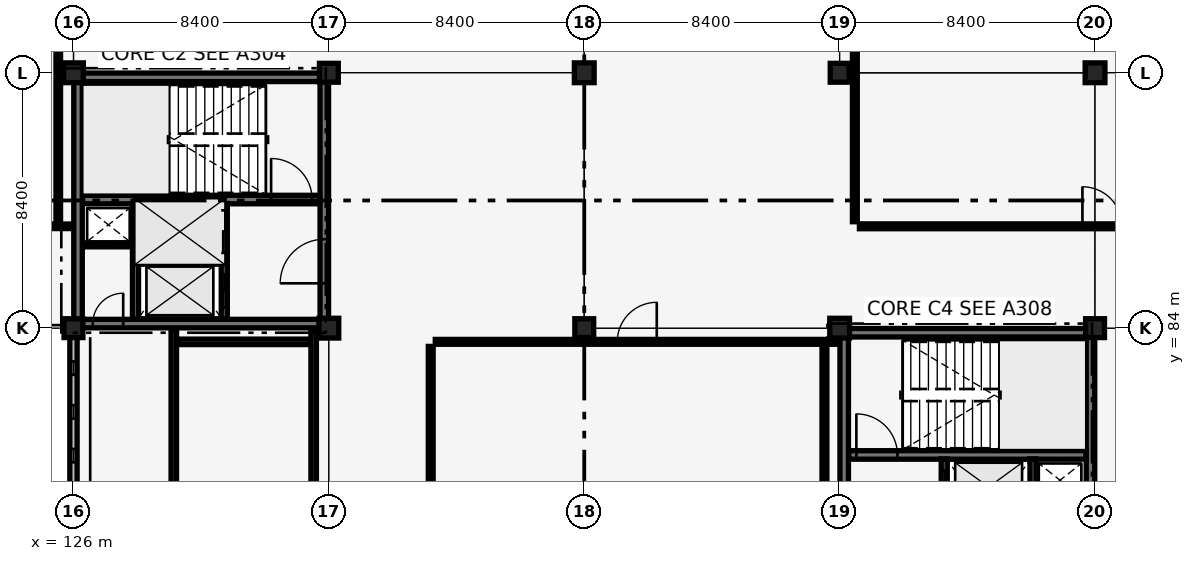
"""IFC4 building model, lengths in metres.
Left out: names, types, materials, properties, quantities, classifications, styles, units other than length and angle.
Written with IfcOpenShell. Run it as: python <this file> out.ifc"""

import sys

from ifc_helpers import new_model, si_unit, direction, frame, frame_2d, origin, origin_2d, place, context, subcontext, project, spatial, rectangle, extrude, element, fill, save


model = new_model("IFC4")
c1 = context("Model", 3, precision=1e-05, world=origin(), true_north=direction((0.0, 1.0)))
c2 = subcontext(c1, "Body", "Model", "MODEL_VIEW")
j1 = project(units=[si_unit("LENGTHUNIT", "METRE"), si_unit("PLANEANGLEUNIT", "RADIAN")], contexts=[c1])
p1 = place(None, origin())
s1 = spatial("IfcSite", under=j1, at=p1, CompositionType="ELEMENT")
p2 = place(p1, origin())
s2 = spatial("IfcBuilding", under=s1, at=p2, CompositionType="ELEMENT")
p3 = place(p2, frame((0.0, 0.0, 13.94)))
s3 = spatial("IfcBuildingStorey", under=s2, at=p3, CompositionType="ELEMENT", Elevation=13.94)
p4 = place(p3, frame((126.15, 84.15, 0.0), z_axis=(0.0, 0.0, 1.0), x_axis=(1.0, 0.0, 0.0)))
e1 = element("IfcWall", 1, at=p4, inside=s3, PredefinedType="SHEAR", context=c2, shape_type="SweptSolid", body=[
    extrude(rectangle(XDim=8.1, YDim=0.28, at=frame_2d((4.05, 0.0))), origin(), (0.0, 0.0, 1.0), 3.78),
])
p5 = place(p4, frame((0.485, 0.0, 0.0)))
e2 = element("IfcOpeningElement", 2, at=p5, cuts=e1, PredefinedType="OPENING", context=c2, shape_type="SweptSolid", body=[
    extrude(rectangle(XDim=1.0, YDim=2.15, at=frame_2d((0.5, 1.075))), frame((0.0, 0.15, 0.0), z_axis=(0.0, -1.0, 0.0), x_axis=(1.0, 0.0, 0.0)), (0.0, 0.0, 1.0), 0.3),
])
for number, where, z_axis, x_axis in (
    (3, (126.15, 92.25, 0.0), (0.0, 0.0, 1.0), (1.0, 0.0, 0.0)),
    (4, (126.15, 84.15, 0.0), (0.0, 0.0, 1.0), (0.0, 1.0, 0.0)),
):
    element("IfcWall", number, at=place(p3, frame(where, z_axis=z_axis, x_axis=x_axis)), inside=s3, PredefinedType="SHEAR", context=c2, shape_type="SweptSolid", body=[
        extrude(rectangle(XDim=8.1, YDim=0.28, at=frame_2d((4.05, 0.0))), origin(), (0.0, 0.0, 1.0), 3.78),
    ])
p6 = place(p3, frame((134.25, 84.15, 0.0), z_axis=(0.0, 0.0, 1.0), x_axis=(0.0, 1.0, 0.0)))
e5 = element("IfcWall", 5, at=p6, inside=s3, PredefinedType="SHEAR", context=c2, shape_type="SweptSolid", body=[
    extrude(rectangle(XDim=8.1, YDim=0.28, at=frame_2d((4.05, 0.0))), origin(), (0.0, 0.0, 1.0), 3.78),
])
p7 = place(p6, frame((1.325, 0.0, 0.0)))
e6 = element("IfcOpeningElement", 6, at=p7, cuts=e5, PredefinedType="OPENING", context=c2, shape_type="SweptSolid", body=[
    extrude(rectangle(XDim=1.45, YDim=2.15, at=frame_2d((0.725, 1.075))), frame((0.0, 0.15, 0.0), z_axis=(0.0, -1.0, 0.0), x_axis=(1.0, 0.0, 0.0)), (0.0, 0.0, 1.0), 0.3),
])
p8 = place(p3, frame((126.3, 88.23, 0.0), z_axis=(0.0, 0.0, 1.0), x_axis=(1.0, 0.0, 0.0)))
e7 = element("IfcWall", 7, at=p8, inside=s3, PredefinedType="SHEAR", context=c2, shape_type="SweptSolid", body=[
    extrude(rectangle(XDim=7.8, YDim=0.28, at=frame_2d((3.9, 0.0))), origin(), (0.0, 0.0, 1.0), 3.78),
])
p9 = place(p8, frame((6.2, 0.0, 0.0)))
e8 = element("IfcOpeningElement", 8, at=p9, cuts=e7, PredefinedType="OPENING", context=c2, shape_type="SweptSolid", body=[
    extrude(rectangle(XDim=1.35, YDim=2.15, at=frame_2d((0.675, 1.075))), frame((0.0, 0.15, 0.0), z_axis=(0.0, -1.0, 0.0), x_axis=(1.0, 0.0, 0.0)), (0.0, 0.0, 1.0), 0.3),
])
p10 = place(p3, frame((151.35, 83.85, 0.0), z_axis=(0.0, 0.0, 1.0), x_axis=(1.0, 0.0, 0.0)))
e9 = element("IfcWall", 9, at=p10, inside=s3, PredefinedType="SHEAR", context=c2, shape_type="SweptSolid", body=[
    extrude(rectangle(XDim=8.1, YDim=0.28, at=frame_2d((4.05, 0.0))), origin(), (0.0, 0.0, 1.0), 3.78),
])
p11 = place(p3, frame((151.35, 75.75, 0.0), z_axis=(0.0, 0.0, 1.0), x_axis=(0.0, 1.0, 0.0)))
e10 = element("IfcWall", 10, at=p11, inside=s3, PredefinedType="SHEAR", context=c2, shape_type="SweptSolid", body=[
    extrude(rectangle(XDim=8.1, YDim=0.28, at=frame_2d((4.05, 0.0))), origin(), (0.0, 0.0, 1.0), 3.78),
])
p12 = place(p11, frame((1.325, 0.0, 0.0)))
e11 = element("IfcOpeningElement", 11, at=p12, cuts=e10, PredefinedType="OPENING", context=c2, shape_type="SweptSolid", body=[
    extrude(rectangle(XDim=1.45, YDim=2.15, at=frame_2d((0.725, 1.075))), frame((0.0, 0.15, 0.0), z_axis=(0.0, -1.0, 0.0), x_axis=(1.0, 0.0, 0.0)), (0.0, 0.0, 1.0), 0.3),
])
p13 = place(p3, frame((159.45, 75.75, 0.0), z_axis=(0.0, 0.0, 1.0), x_axis=(0.0, 1.0, 0.0)))
e12 = element("IfcWall", 12, at=p13, inside=s3, PredefinedType="SHEAR", context=c2, shape_type="SweptSolid", body=[
    extrude(rectangle(XDim=8.1, YDim=0.28, at=frame_2d((4.05, 0.0))), origin(), (0.0, 0.0, 1.0), 3.78),
])
p14 = place(p3, frame((151.5, 79.83, 0.0), z_axis=(0.0, 0.0, 1.0), x_axis=(1.0, 0.0, 0.0)))
e13 = element("IfcWall", 13, at=p14, inside=s3, PredefinedType="SHEAR", context=c2, shape_type="SweptSolid", body=[
    extrude(rectangle(XDim=7.8, YDim=0.28, at=frame_2d((3.9, 0.0))), origin(), (0.0, 0.0, 1.0), 3.78),
])
p15 = place(p14, frame((0.25, 0.0, 0.0)))
e14 = element("IfcOpeningElement", 14, at=p15, cuts=e13, PredefinedType="OPENING", context=c2, shape_type="SweptSolid", body=[
    extrude(rectangle(XDim=1.35, YDim=2.15, at=frame_2d((0.675, 1.075))), frame((0.0, 0.15, 0.0), z_axis=(0.0, -1.0, 0.0), x_axis=(1.0, 0.0, 0.0)), (0.0, 0.0, 1.0), 0.3),
])
p16 = place(p3, frame((126.0, 84.0, 0.0), z_axis=(0.0, 0.0, 1.0), x_axis=(1.0, 0.0, 0.0)))
e15 = element("IfcColumn", 15, at=p16, inside=s3, PredefinedType="COLUMN", context=c2, shape_type="SweptSolid", body=[
    extrude(rectangle(XDim=0.62, YDim=0.62, at=origin_2d()), origin(), (0.0, 0.0, 1.0), 3.78),
])
for number, where, z_axis, x_axis in (
    (16, (126.0, 92.4, 0.0), (0.0, 0.0, 1.0), (1.0, 0.0, 0.0)),
    (17, (134.4, 84.0, 0.0), (0.0, 0.0, 1.0), (1.0, 0.0, 0.0)),
):
    element("IfcColumn", number, at=place(p3, frame(where, z_axis=z_axis, x_axis=x_axis)), inside=s3, PredefinedType="COLUMN", context=c2, shape_type="SweptSolid", body=[
        extrude(rectangle(XDim=0.65, YDim=0.65, at=origin_2d()), origin(), (0.0, 0.0, 1.0), 3.78),
    ])
for number, where, z_axis, x_axis in (
    (18, (134.4, 92.4, 0.0), (0.0, 0.0, 1.0), (1.0, 0.0, 0.0)),
    (19, (142.8, 84.0, 0.0), (0.0, 0.0, 1.0), (1.0, 0.0, 0.0)),
):
    element("IfcColumn", number, at=place(p3, frame(where, z_axis=z_axis, x_axis=x_axis)), inside=s3, PredefinedType="COLUMN", context=c2, shape_type="SweptSolid", body=[
        extrude(rectangle(XDim=0.62, YDim=0.62, at=origin_2d()), origin(), (0.0, 0.0, 1.0), 3.78),
    ])
for number, where, z_axis, x_axis in (
    (20, (142.8, 92.4, 0.0), (0.0, 0.0, 1.0), (1.0, 0.0, 0.0)),
    (21, (151.2, 84.0, 0.0), (0.0, 0.0, 1.0), (1.0, 0.0, 0.0)),
):
    element("IfcColumn", number, at=place(p3, frame(where, z_axis=z_axis, x_axis=x_axis)), inside=s3, PredefinedType="COLUMN", context=c2, shape_type="SweptSolid", body=[
        extrude(rectangle(XDim=0.65, YDim=0.65, at=origin_2d()), origin(), (0.0, 0.0, 1.0), 3.78),
    ])
for number, where, z_axis, x_axis in (
    (22, (151.2, 92.4, 0.0), (0.0, 0.0, 1.0), (1.0, 0.0, 0.0)),
    (23, (159.6, 84.0, 0.0), (0.0, 0.0, 1.0), (1.0, 0.0, 0.0)),
):
    element("IfcColumn", number, at=place(p3, frame(where, z_axis=z_axis, x_axis=x_axis)), inside=s3, PredefinedType="COLUMN", context=c2, shape_type="SweptSolid", body=[
        extrude(rectangle(XDim=0.62, YDim=0.62, at=origin_2d()), origin(), (0.0, 0.0, 1.0), 3.78),
    ])
p17 = place(p3, frame((159.6, 92.4, 0.0), z_axis=(0.0, 0.0, 1.0), x_axis=(1.0, 0.0, 0.0)))
e24 = element("IfcColumn", 24, at=p17, inside=s3, PredefinedType="COLUMN", context=c2, shape_type="SweptSolid", body=[
    extrude(rectangle(XDim=0.65, YDim=0.65, at=origin_2d()), origin(), (0.0, 0.0, 1.0), 3.78),
])
p18 = place(p3, frame((126.0, 75.91, 0.0), z_axis=(0.0, 0.0, 1.0), x_axis=(0.0, 1.0, 0.0)))
e25 = element("IfcWall", 25, at=p18, inside=s3, PredefinedType="SOLIDWALL", context=c2, shape_type="SweptSolid", body=[
    extrude(rectangle(XDim=7.795, YDim=0.24, at=frame_2d((3.897, 0.0))), origin(), (0.0, 0.0, 1.0), 3.15),
])
p19 = place(p18, frame((0.8, 0.0, 0.35)))
e26 = element("IfcOpeningElement", 26, at=p19, cuts=e25, PredefinedType="OPENING", context=c2, shape_type="SweptSolid", body=[
    extrude(rectangle(XDim=0.44, YDim=1.25, at=frame_2d((0.22, 0.625))), frame((0.0, 0.13, 0.0), z_axis=(0.0, -1.0, 0.0), x_axis=(1.0, 0.0, 0.0)), (0.0, 0.0, 1.0), 0.26),
])
p20 = place(p18, frame((2.239, 0.0, 0.35)))
e27 = element("IfcOpeningElement", 27, at=p20, cuts=e25, PredefinedType="OPENING", context=c2, shape_type="SweptSolid", body=[
    extrude(rectangle(XDim=0.44, YDim=1.25, at=frame_2d((0.22, 0.625))), frame((0.0, 0.13, 0.0), z_axis=(0.0, -1.0, 0.0), x_axis=(1.0, 0.0, 0.0)), (0.0, 0.0, 1.0), 0.26),
])
p21 = place(p18, frame((3.677, 0.0, 0.35)))
e28 = element("IfcOpeningElement", 28, at=p21, cuts=e25, PredefinedType="OPENING", context=c2, shape_type="SweptSolid", body=[
    extrude(rectangle(XDim=0.44, YDim=1.25, at=frame_2d((0.22, 0.625))), frame((0.0, 0.13, 0.0), z_axis=(0.0, -1.0, 0.0), x_axis=(1.0, 0.0, 0.0)), (0.0, 0.0, 1.0), 0.26),
])
p22 = place(p18, frame((5.116, 0.0, 0.35)))
e29 = element("IfcOpeningElement", 29, at=p22, cuts=e25, PredefinedType="OPENING", context=c2, shape_type="SweptSolid", body=[
    extrude(rectangle(XDim=0.44, YDim=1.25, at=frame_2d((0.22, 0.625))), frame((0.0, 0.13, 0.0), z_axis=(0.0, -1.0, 0.0), x_axis=(1.0, 0.0, 0.0)), (0.0, 0.0, 1.0), 0.26),
])
p23 = place(p18, frame((6.555, 0.0, 0.35)))
e30 = element("IfcOpeningElement", 30, at=p23, cuts=e25, PredefinedType="OPENING", context=c2, shape_type="SweptSolid", body=[
    extrude(rectangle(XDim=0.44, YDim=1.25, at=frame_2d((0.22, 0.625))), frame((0.0, 0.13, 0.0), z_axis=(0.0, -1.0, 0.0), x_axis=(1.0, 0.0, 0.0)), (0.0, 0.0, 1.0), 0.26),
])
p24 = place(p3, frame((130.96, 84.3, 0.0), z_axis=(0.0, 0.0, 1.0), x_axis=(0.0, 1.0, 0.0)))
e31 = element("IfcWall", 31, at=p24, inside=s3, PredefinedType="SHEAR", context=c2, shape_type="SweptSolid", body=[
    extrude(rectangle(XDim=3.8, YDim=0.2, at=frame_2d((1.9, 0.0))), origin(), (0.0, 0.0, 1.0), 3.05),
])
p25 = place(p24, frame((0.375, 0.0, 0.0)))
e32 = element("IfcOpeningElement", 32, at=p25, cuts=e31, PredefinedType="OPENING", context=c2, shape_type="SweptSolid", body=[
    extrude(rectangle(XDim=1.1, YDim=2.15, at=frame_2d((0.55, 1.075))), frame((0.0, 0.11, 0.0), z_axis=(0.0, -1.0, 0.0), x_axis=(1.0, 0.0, 0.0)), (0.0, 0.0, 1.0), 0.22),
])
p26 = place(p24, frame((2.175, 0.0, 0.0)))
e33 = element("IfcOpeningElement", 33, at=p26, cuts=e31, PredefinedType="OPENING", context=c2, shape_type="SweptSolid", body=[
    extrude(rectangle(XDim=1.4, YDim=2.2, at=frame_2d((0.7, 1.1))), frame((0.0, 0.11, 0.0), z_axis=(0.0, -1.0, 0.0), x_axis=(1.0, 0.0, 0.0)), (0.0, 0.0, 1.0), 0.22),
])
p27 = place(p3, frame((128.04, 84.3, 0.0), z_axis=(0.0, 0.0, 1.0), x_axis=(0.0, 1.0, 0.0)))
e34 = element("IfcWall", 34, at=p27, inside=s3, PredefinedType="SHEAR", context=c2, shape_type="SweptSolid", body=[
    extrude(rectangle(XDim=3.8, YDim=0.2, at=frame_2d((1.9, 0.0))), origin(), (0.0, 0.0, 1.0), 3.05),
])
p28 = place(p3, frame((128.15, 86.2, 0.0), z_axis=(0.0, 0.0, 1.0), x_axis=(1.0, 0.0, 0.0)))
e35 = element("IfcWall", 35, at=p28, inside=s3, PredefinedType="SHEAR", context=c2, shape_type="SweptSolid", body=[
    extrude(rectangle(XDim=2.7, YDim=0.18, at=frame_2d((1.35, 0.0))), origin(), (0.0, 0.0, 1.0), 3.78),
])
p29 = place(p3, frame((126.32, 86.74, 0.0), z_axis=(0.0, 0.0, 1.0), x_axis=(1.0, 0.0, 0.0)))
e36 = element("IfcWall", 36, at=p29, inside=s3, PredefinedType="PARTITIONING", context=c2, shape_type="SweptSolid", body=[
    extrude(rectangle(XDim=1.62, YDim=0.13, at=frame_2d((0.81, 0.0))), origin(), (0.0, 0.0, 1.0), 3.78),
])
p30 = place(p3, frame((154.64, 75.9, 0.0), z_axis=(0.0, 0.0, 1.0), x_axis=(0.0, 1.0, 0.0)))
e37 = element("IfcWall", 37, at=p30, inside=s3, PredefinedType="SHEAR", context=c2, shape_type="SweptSolid", body=[
    extrude(rectangle(XDim=3.8, YDim=0.2, at=frame_2d((1.9, 0.0))), origin(), (0.0, 0.0, 1.0), 3.78),
])
p31 = place(p30, frame((0.375, 0.0, 0.0)))
e38 = element("IfcOpeningElement", 38, at=p31, cuts=e37, PredefinedType="OPENING", context=c2, shape_type="SweptSolid", body=[
    extrude(rectangle(XDim=1.1, YDim=2.15, at=frame_2d((0.55, 1.075))), frame((0.0, 0.11, 0.0), z_axis=(0.0, -1.0, 0.0), x_axis=(1.0, 0.0, 0.0)), (0.0, 0.0, 1.0), 0.22),
])
p32 = place(p30, frame((2.325, 0.0, 0.0)))
e39 = element("IfcOpeningElement", 39, at=p32, cuts=e37, PredefinedType="OPENING", context=c2, shape_type="SweptSolid", body=[
    extrude(rectangle(XDim=1.1, YDim=2.15, at=frame_2d((0.55, 1.075))), frame((0.0, 0.11, 0.0), z_axis=(0.0, -1.0, 0.0), x_axis=(1.0, 0.0, 0.0)), (0.0, 0.0, 1.0), 0.22),
])
p33 = place(p3, frame((157.56, 75.9, 0.0), z_axis=(0.0, 0.0, 1.0), x_axis=(0.0, 1.0, 0.0)))
e40 = element("IfcWall", 40, at=p33, inside=s3, PredefinedType="SHEAR", context=c2, shape_type="SweptSolid", body=[
    extrude(rectangle(XDim=3.8, YDim=0.2, at=frame_2d((1.9, 0.0))), origin(), (0.0, 0.0, 1.0), 3.78),
])
p34 = place(p3, frame((129.45, 83.55, 0.0), z_axis=(0.0, 0.0, 1.0), x_axis=(1.0, 0.0, 0.0)))
e41 = element("IfcWall", 41, at=p34, inside=s3, PredefinedType="PARTITIONING", context=c2, shape_type="SweptSolid", body=[
    extrude(rectangle(XDim=4.3, YDim=0.18, at=frame_2d((2.15, 0.0))), origin(), (0.0, 0.0, 1.0), 3.78),
])
for number, where, z_axis, x_axis in (
    (42, (129.3, 36.7, 0.0), (0.0, 0.0, 1.0), (0.0, 1.0, 0.0)),
    (43, (133.9, 36.7, 0.0), (0.0, 0.0, 1.0), (0.0, 1.0, 0.0)),
):
    element("IfcWall", number, at=place(p3, frame(where, z_axis=z_axis, x_axis=x_axis)), inside=s3, PredefinedType="PARTITIONING", context=c2, shape_type="SweptSolid", body=[
        extrude(rectangle(XDim=47.27, YDim=0.18, at=frame_2d((23.635, 0.0))), origin(), (0.0, 0.0, 1.0), 3.05),
    ])
p35 = place(p3, frame((151.85, 87.35, 0.0), z_axis=(0.0, 0.0, 1.0), x_axis=(1.0, 0.0, 0.0)))
e44 = element("IfcWall", 44, at=p35, inside=s3, PredefinedType="PARTITIONING", context=c2, shape_type="SweptSolid", body=[
    extrude(rectangle(XDim=15.97, YDim=0.16, at=frame_2d((7.985, 0.0))), origin(), (0.0, 0.0, 1.0), 3.15),
])
p36 = place(p35, frame((7.335, 0.0, 0.0)))
e45 = element("IfcOpeningElement", 45, at=p36, cuts=e44, PredefinedType="OPENING", context=c2, shape_type="SweptSolid", body=[
    extrude(rectangle(XDim=1.3, YDim=2.2, at=frame_2d((0.65, 1.1))), frame((0.0, 0.09, 0.0), z_axis=(0.0, -1.0, 0.0), x_axis=(1.0, 0.0, 0.0)), (0.0, 0.0, 1.0), 0.18),
])
p37 = place(p3, frame((151.7, 87.5, 0.0), z_axis=(0.0, 0.0, 1.0), x_axis=(0.0, 1.0, 0.0)))
e46 = element("IfcWall", 46, at=p37, inside=s3, PredefinedType="PARTITIONING", context=c2, shape_type="SweptSolid", body=[
    extrude(rectangle(XDim=29.82, YDim=0.16, at=frame_2d((14.91, 0.0))), origin(), (0.0, 0.0, 1.0), 3.05),
])
p38 = place(p3, frame((109.23, 87.35, 0.0), z_axis=(0.0, 0.0, 1.0), x_axis=(1.0, 0.0, 0.0)))
e47 = element("IfcWall", 47, at=p38, inside=s3, PredefinedType="PARTITIONING", context=c2, shape_type="SweptSolid", body=[
    extrude(rectangle(XDim=16.74, YDim=0.15, at=frame_2d((8.37, 0.0))), origin(), (0.0, 0.0, 1.0), 3.1),
])
p39 = place(p38, frame((7.845, 0.0, 0.0)))
e48 = element("IfcOpeningElement", 48, at=p39, cuts=e47, PredefinedType="OPENING", context=c2, shape_type="SweptSolid", body=[
    extrude(rectangle(XDim=1.05, YDim=2.15, at=frame_2d((0.525, 1.075))), frame((0.0, 0.085, 0.0), z_axis=(0.0, -1.0, 0.0), x_axis=(1.0, 0.0, 0.0)), (0.0, 0.0, 1.0), 0.17),
])
p40 = place(p3, frame((125.5, 87.5, 0.0), z_axis=(0.0, 0.0, 1.0), x_axis=(0.0, 1.0, 0.0)))
e49 = element("IfcWall", 49, at=p40, inside=s3, PredefinedType="PARTITIONING", context=c2, shape_type="SweptSolid", body=[
    extrude(rectangle(XDim=29.82, YDim=0.15, at=frame_2d((14.91, 0.0))), origin(), (0.0, 0.0, 1.0), 3.05),
])
p41 = place(p3, frame((137.9, 83.55, 0.0), z_axis=(0.0, 0.0, 1.0), x_axis=(1.0, 0.0, 0.0)))
e50 = element("IfcWall", 50, at=p41, inside=s3, PredefinedType="PARTITIONING", context=c2, shape_type="SweptSolid", body=[
    extrude(rectangle(XDim=13.27, YDim=0.16, at=frame_2d((6.635, 0.0))), origin(), (0.0, 0.0, 1.0), 3.1),
])
p42 = place(p41, frame((5.985, 0.0, 0.0)))
e51 = element("IfcOpeningElement", 51, at=p42, cuts=e50, PredefinedType="OPENING", context=c2, shape_type="SweptSolid", body=[
    extrude(rectangle(XDim=1.3, YDim=2.2, at=frame_2d((0.65, 1.1))), frame((0.0, 0.09, 0.0), z_axis=(0.0, -1.0, 0.0), x_axis=(1.0, 0.0, 0.0)), (0.0, 0.0, 1.0), 0.18),
])
for number, where, z_axis, x_axis in (
    (52, (137.75, 67.8, 0.0), (0.0, 0.0, 1.0), (0.0, 1.0, 0.0)),
    (53, (150.7, 67.8, 0.0), (0.0, 0.0, 1.0), (0.0, 1.0, 0.0)),
):
    element("IfcWall", number, at=place(p3, frame(where, z_axis=z_axis, x_axis=x_axis)), inside=s3, PredefinedType="PARTITIONING", context=c2, shape_type="SweptSolid", body=[
        extrude(rectangle(XDim=15.6, YDim=0.16, at=frame_2d((7.8, 0.0))), origin(), (0.0, 0.0, 1.0), 3.13),
    ])
p43 = place(p21, origin())
e54 = element("IfcWindow", 54, at=p43, inside=s3, PartitioningType="SINGLE_PANEL", PredefinedType="WINDOW", context=c2, shape_type="SweptSolid", body=[
    extrude(rectangle(XDim=0.44, YDim=1.25, at=frame_2d((0.22, 0.625))), frame((0.0, 0.03, 0.0), z_axis=(0.0, -1.0, 0.0), x_axis=(1.0, 0.0, 0.0)), (0.0, 0.0, 1.0), 0.06),
])
fill(e28, e54)
p44 = place(p22, origin())
e55 = element("IfcWindow", 55, at=p44, inside=s3, PartitioningType="SINGLE_PANEL", PredefinedType="WINDOW", context=c2, shape_type="SweptSolid", body=[
    extrude(rectangle(XDim=0.44, YDim=1.25, at=frame_2d((0.22, 0.625))), frame((0.0, 0.03, 0.0), z_axis=(0.0, -1.0, 0.0), x_axis=(1.0, 0.0, 0.0)), (0.0, 0.0, 1.0), 0.06),
])
fill(e29, e55)
p45 = place(p23, origin())
e56 = element("IfcWindow", 56, at=p45, inside=s3, PartitioningType="SINGLE_PANEL", PredefinedType="WINDOW", context=c2, shape_type="SweptSolid", body=[
    extrude(rectangle(XDim=0.44, YDim=1.25, at=frame_2d((0.22, 0.625))), frame((0.0, 0.03, 0.0), z_axis=(0.0, -1.0, 0.0), x_axis=(1.0, 0.0, 0.0)), (0.0, 0.0, 1.0), 0.06),
])
fill(e30, e56)
p46 = place(p9, origin())
e57 = element("IfcDoor", 57, at=p46, inside=s3, OperationType="SINGLE_SWING_LEFT", PredefinedType="DOOR", context=c2, shape_type="SweptSolid", body=[
    extrude(rectangle(XDim=1.35, YDim=2.15, at=frame_2d((0.675, 1.075))), frame((0.0, 0.025, 0.0), z_axis=(0.0, -1.0, 0.0), x_axis=(1.0, 0.0, 0.0)), (0.0, 0.0, 1.0), 0.05),
])
fill(e8, e57)
p47 = place(p25, origin())
e58 = element("IfcDoor", 58, at=p47, inside=s3, OperationType="SLIDING_TO_LEFT", PredefinedType="DOOR", context=c2, shape_type="SweptSolid", body=[
    extrude(rectangle(XDim=1.1, YDim=2.15, at=frame_2d((0.55, 1.075))), frame((0.0, 0.025, 0.0), z_axis=(0.0, -1.0, 0.0), x_axis=(1.0, 0.0, 0.0)), (0.0, 0.0, 1.0), 0.05),
])
fill(e32, e58)
p48 = place(p26, origin())
e59 = element("IfcDoor", 59, at=p48, inside=s3, OperationType="SLIDING_TO_LEFT", PredefinedType="DOOR", context=c2, shape_type="SweptSolid", body=[
    extrude(rectangle(XDim=1.4, YDim=2.2, at=frame_2d((0.7, 1.1))), frame((0.0, 0.025, 0.0), z_axis=(0.0, -1.0, 0.0), x_axis=(1.0, 0.0, 0.0)), (0.0, 0.0, 1.0), 0.05),
])
fill(e33, e59)
p49 = place(p7, origin())
e60 = element("IfcDoor", 60, at=p49, inside=s3, OperationType="DOUBLE_DOOR_SINGLE_SWING", PredefinedType="DOOR", context=c2, shape_type="SweptSolid", body=[
    extrude(rectangle(XDim=1.45, YDim=2.15, at=frame_2d((0.725, 1.075))), frame((0.0, 0.025, 0.0), z_axis=(0.0, -1.0, 0.0), x_axis=(1.0, 0.0, 0.0)), (0.0, 0.0, 1.0), 0.05),
])
fill(e6, e60)
p50 = place(p5, origin())
e61 = element("IfcDoor", 61, at=p50, inside=s3, OperationType="SINGLE_SWING_RIGHT", PredefinedType="DOOR", context=c2, shape_type="SweptSolid", body=[
    extrude(rectangle(XDim=1.0, YDim=2.15, at=frame_2d((0.5, 1.075))), frame((0.0, 0.025, 0.0), z_axis=(0.0, -1.0, 0.0), x_axis=(1.0, 0.0, 0.0)), (0.0, 0.0, 1.0), 0.05),
])
fill(e2, e61)
p51 = place(p15, origin())
e62 = element("IfcDoor", 62, at=p51, inside=s3, OperationType="SINGLE_SWING_LEFT", PredefinedType="DOOR", context=c2, shape_type="SweptSolid", body=[
    extrude(rectangle(XDim=1.35, YDim=2.15, at=frame_2d((0.675, 1.075))), frame((0.0, 0.025, 0.0), z_axis=(0.0, -1.0, 0.0), x_axis=(1.0, 0.0, 0.0)), (0.0, 0.0, 1.0), 0.05),
])
fill(e14, e62)
p52 = place(p32, origin())
e63 = element("IfcDoor", 63, at=p52, inside=s3, OperationType="SLIDING_TO_LEFT", PredefinedType="DOOR", context=c2, shape_type="SweptSolid", body=[
    extrude(rectangle(XDim=1.1, YDim=2.15, at=frame_2d((0.55, 1.075))), frame((0.0, 0.025, 0.0), z_axis=(0.0, -1.0, 0.0), x_axis=(1.0, 0.0, 0.0)), (0.0, 0.0, 1.0), 0.05),
])
fill(e39, e63)
p53 = place(p36, origin())
e64 = element("IfcDoor", 64, at=p53, inside=s3, OperationType="SINGLE_SWING_LEFT", PredefinedType="DOOR", context=c2, shape_type="SweptSolid", body=[
    extrude(rectangle(XDim=1.3, YDim=2.2, at=frame_2d((0.65, 1.1))), frame((0.0, 0.025, 0.0), z_axis=(0.0, -1.0, 0.0), x_axis=(1.0, 0.0, 0.0)), (0.0, 0.0, 1.0), 0.05),
])
fill(e45, e64)
p54 = place(p42, origin())
e65 = element("IfcDoor", 65, at=p54, inside=s3, OperationType="SINGLE_SWING_RIGHT", PredefinedType="DOOR", context=c2, shape_type="SweptSolid", body=[
    extrude(rectangle(XDim=1.3, YDim=2.2, at=frame_2d((0.65, 1.1))), frame((0.0, 0.025, 0.0), z_axis=(0.0, -1.0, 0.0), x_axis=(1.0, 0.0, 0.0)), (0.0, 0.0, 1.0), 0.05),
])
fill(e51, e65)
save(model, sys.argv[1])
